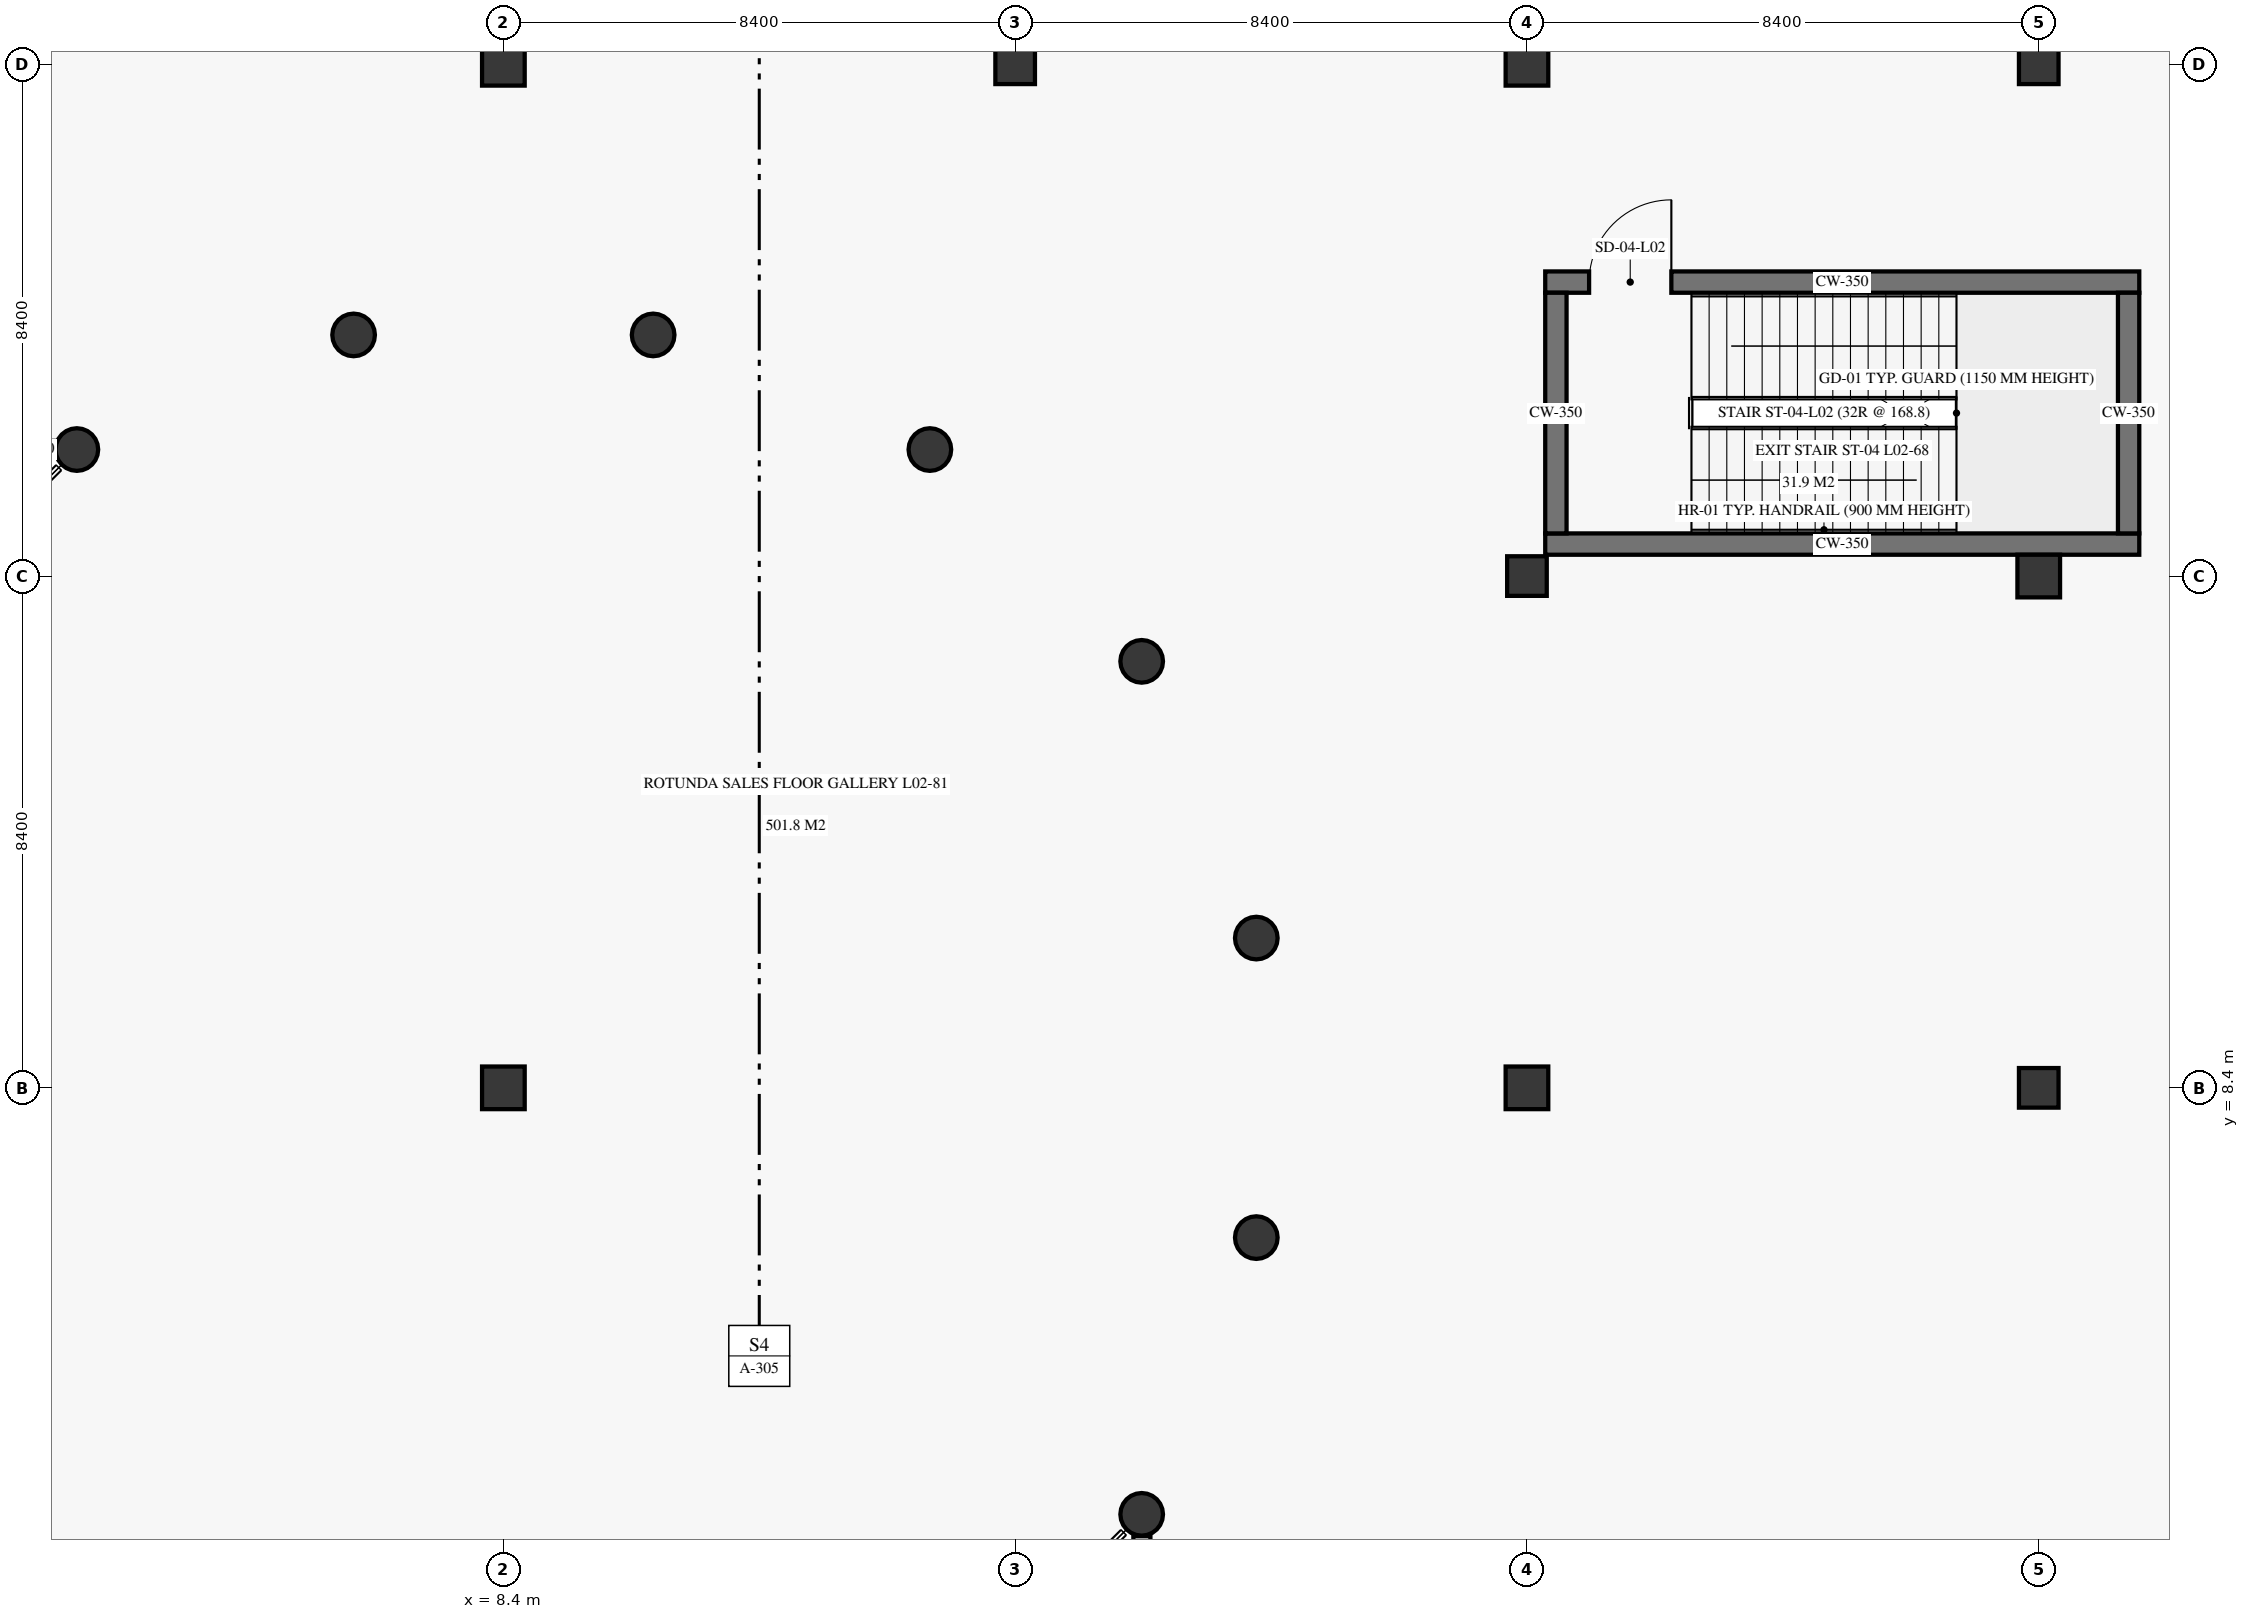
"""IFC4 building model, lengths in metres.
Left out: names, types, materials, properties, quantities, classifications, styles, units other than length and angle.
Written with IfcOpenShell. Run it as: python <this file> out.ifc"""

import sys

from ifc_helpers import new_model, si_unit, direction, frame, frame_2d, origin, origin_2d, place, context, subcontext, project, spatial, rectangle, circle, extrude, element, fill, save


model = new_model("IFC4")
c1 = context("Model", 3, precision=1e-05, world=origin(), true_north=direction((0.0, 1.0)))
c2 = subcontext(c1, "Body", "Model", "MODEL_VIEW")
j1 = project(units=[si_unit("LENGTHUNIT", "METRE"), si_unit("PLANEANGLEUNIT", "RADIAN")], contexts=[c1])
p1 = place(None, origin())
s1 = spatial("IfcSite", under=j1, at=p1, CompositionType="ELEMENT")
p2 = place(p1, origin())
s2 = spatial("IfcBuilding", under=s1, at=p2, CompositionType="ELEMENT")
p3 = place(p2, frame((0.0, 0.0, 6.0)))
s3 = spatial("IfcBuildingStorey", under=s2, at=p3, CompositionType="ELEMENT", Elevation=6.0)
for number, where, z_axis, x_axis in (
    (1, (8.4, 8.4, 0.0), (0.0, 0.0, 1.0), (1.0, 0.0, 0.0)),
    (2, (8.4, 25.2, 0.0), (0.0, 0.0, 1.0), (1.0, 0.0, 0.0)),
):
    element("IfcColumn", number, at=place(p3, frame(where, z_axis=z_axis, x_axis=x_axis)), inside=s3, PredefinedType="COLUMN", context=c2, shape_type="SweptSolid", body=[
        extrude(rectangle(XDim=0.7, YDim=0.7, at=origin_2d()), origin(), (0.0, 0.0, 1.0), 5.1),
    ])
p4 = place(p3, frame((16.8, 25.2, 0.0), z_axis=(0.0, 0.0, 1.0), x_axis=(1.0, 0.0, 0.0)))
e3 = element("IfcColumn", 3, at=p4, inside=s3, PredefinedType="COLUMN", context=c2, shape_type="SweptSolid", body=[
    extrude(rectangle(XDim=0.65, YDim=0.65, at=origin_2d()), origin(), (0.0, 0.0, 1.0), 5.1),
])
p5 = place(p3, frame((25.2, 8.4, 0.0), z_axis=(0.0, 0.0, 1.0), x_axis=(1.0, 0.0, 0.0)))
e4 = element("IfcColumn", 4, at=p5, inside=s3, PredefinedType="COLUMN", context=c2, shape_type="SweptSolid", body=[
    extrude(rectangle(XDim=0.7, YDim=0.7, at=origin_2d()), origin(), (0.0, 0.0, 1.0), 5.1),
])
p6 = place(p3, frame((25.2, 16.8, 0.0), z_axis=(0.0, 0.0, 1.0), x_axis=(1.0, 0.0, 0.0)))
e5 = element("IfcColumn", 5, at=p6, inside=s3, PredefinedType="COLUMN", context=c2, shape_type="SweptSolid", body=[
    extrude(rectangle(XDim=0.65, YDim=0.65, at=origin_2d()), origin(), (0.0, 0.0, 1.0), 5.1),
])
p7 = place(p3, frame((25.2, 25.2, 0.0), z_axis=(0.0, 0.0, 1.0), x_axis=(1.0, 0.0, 0.0)))
e6 = element("IfcColumn", 6, at=p7, inside=s3, PredefinedType="COLUMN", context=c2, shape_type="SweptSolid", body=[
    extrude(rectangle(XDim=0.7, YDim=0.7, at=origin_2d()), origin(), (0.0, 0.0, 1.0), 5.1),
])
p8 = place(p3, frame((33.6, 8.4, 0.0), z_axis=(0.0, 0.0, 1.0), x_axis=(1.0, 0.0, 0.0)))
e7 = element("IfcColumn", 7, at=p8, inside=s3, PredefinedType="COLUMN", context=c2, shape_type="SweptSolid", body=[
    extrude(rectangle(XDim=0.65, YDim=0.65, at=origin_2d()), origin(), (0.0, 0.0, 1.0), 5.1),
])
p9 = place(p3, frame((33.6, 16.8, 0.0), z_axis=(0.0, 0.0, 1.0), x_axis=(1.0, 0.0, 0.0)))
e8 = element("IfcColumn", 8, at=p9, inside=s3, PredefinedType="COLUMN", context=c2, shape_type="SweptSolid", body=[
    extrude(rectangle(XDim=0.7, YDim=0.7, at=origin_2d()), origin(), (0.0, 0.0, 1.0), 5.1),
])
p10 = place(p3, frame((33.6, 25.2, 0.0), z_axis=(0.0, 0.0, 1.0), x_axis=(1.0, 0.0, 0.0)))
e9 = element("IfcColumn", 9, at=p10, inside=s3, PredefinedType="COLUMN", context=c2, shape_type="SweptSolid", body=[
    extrude(rectangle(XDim=0.65, YDim=0.65, at=origin_2d()), origin(), (0.0, 0.0, 1.0), 5.1),
])
for number, where, z_axis, x_axis in (
    (10, (20.758, 10.858, 0.0), (0.0, 0.0, 1.0), (1.0, 0.0, 0.0)),
    (11, (18.876, 15.4, 0.0), (0.0, 0.0, 1.0), (1.0, 0.0, 0.0)),
    (12, (15.4, 18.876, 0.0), (0.0, 0.0, 1.0), (1.0, 0.0, 0.0)),
    (13, (10.858, 20.758, 0.0), (0.0, 0.0, 1.0), (1.0, 0.0, 0.0)),
    (14, (5.942, 20.758, 0.0), (0.0, 0.0, 1.0), (1.0, 0.0, 0.0)),
    (15, (1.4, 18.876, 0.0), (0.0, 0.0, 1.0), (1.0, 0.0, 0.0)),
    (16, (18.876, 1.4, 0.0), (0.0, 0.0, 1.0), (1.0, 0.0, 0.0)),
    (17, (20.758, 5.942, 0.0), (0.0, 0.0, 1.0), (1.0, 0.0, 0.0)),
):
    element("IfcColumn", number, at=place(p3, frame(where, z_axis=z_axis, x_axis=x_axis)), inside=s3, PredefinedType="COLUMN", context=c2, shape_type="SweptSolid", body=[
        extrude(circle(Radius=0.35, at=origin_2d()), origin(), (0.0, 0.0, 1.0), 5.1),
    ])
for number, where, z_axis, x_axis in (
    (18, (0.15, 18.88, 0.0), (0.0, 0.0, 1.0), (1.0, 0.0, 0.0)),
    (19, (18.88, 0.15, 0.0), (0.0, 0.0, 1.0), (0.0, 1.0, 0.0)),
):
    element("IfcWall", number, at=place(p3, frame(where, z_axis=z_axis, x_axis=x_axis)), inside=s3, PredefinedType="SOLIDWALL", context=c2, shape_type="SweptSolid", body=[
        extrude(rectangle(XDim=0.896, YDim=0.28, at=frame_2d((0.448, 0.0))), origin(), (0.0, 0.0, 1.0), 4.38),
    ])
p11 = place(p3, frame((25.5, 17.325, 0.0), z_axis=(0.0, 0.0, 1.0), x_axis=(1.0, 0.0, 0.0)))
e20 = element("IfcWall", 20, at=p11, inside=s3, PredefinedType="SHEAR", context=c2, shape_type="SweptSolid", body=[
    extrude(rectangle(XDim=9.75, YDim=0.35, at=frame_2d((4.875, 0.0))), origin(), (0.0, 0.0, 1.0), 5.1),
])
p12 = place(p3, frame((25.5, 21.625, 0.0), z_axis=(0.0, 0.0, 1.0), x_axis=(1.0, 0.0, 0.0)))
e21 = element("IfcWall", 21, at=p12, inside=s3, PredefinedType="SHEAR", context=c2, shape_type="SweptSolid", body=[
    extrude(rectangle(XDim=9.75, YDim=0.35, at=frame_2d((4.875, 0.0))), origin(), (0.0, 0.0, 1.0), 5.1),
])
p13 = place(p12, frame((0.72, 0.0, 0.0)))
e22 = element("IfcOpeningElement", 22, at=p13, cuts=e21, PredefinedType="OPENING", context=c2, shape_type="SweptSolid", body=[
    extrude(rectangle(XDim=1.35, YDim=2.25, at=frame_2d((0.675, 1.125))), frame((0.0, 0.185, 0.0), z_axis=(0.0, -1.0, 0.0), x_axis=(1.0, 0.0, 0.0)), (0.0, 0.0, 1.0), 0.37),
])
for number, where, z_axis, x_axis in (
    (23, (25.675, 17.5, 0.0), (0.0, 0.0, 1.0), (0.0, 1.0, 0.0)),
    (24, (35.075, 17.5, 0.0), (0.0, 0.0, 1.0), (0.0, 1.0, 0.0)),
):
    element("IfcWall", number, at=place(p3, frame(where, z_axis=z_axis, x_axis=x_axis)), inside=s3, PredefinedType="SHEAR", context=c2, shape_type="SweptSolid", body=[
        extrude(rectangle(XDim=3.95, YDim=0.35, at=frame_2d((1.975, 0.0))), origin(), (0.0, 0.0, 1.0), 5.1),
    ])
p14 = place(p13, origin())
e25 = element("IfcDoor", 25, at=p14, inside=s3, OperationType="SINGLE_SWING_RIGHT", PredefinedType="DOOR", context=c2, shape_type="SweptSolid", body=[
    extrude(rectangle(XDim=1.35, YDim=2.25, at=frame_2d((0.675, 1.125))), frame((0.0, 0.025, 0.0), z_axis=(0.0, -1.0, 0.0), x_axis=(1.0, 0.0, 0.0)), (0.0, 0.0, 1.0), 0.05),
])
fill(e22, e25)
save(model, sys.argv[1])
